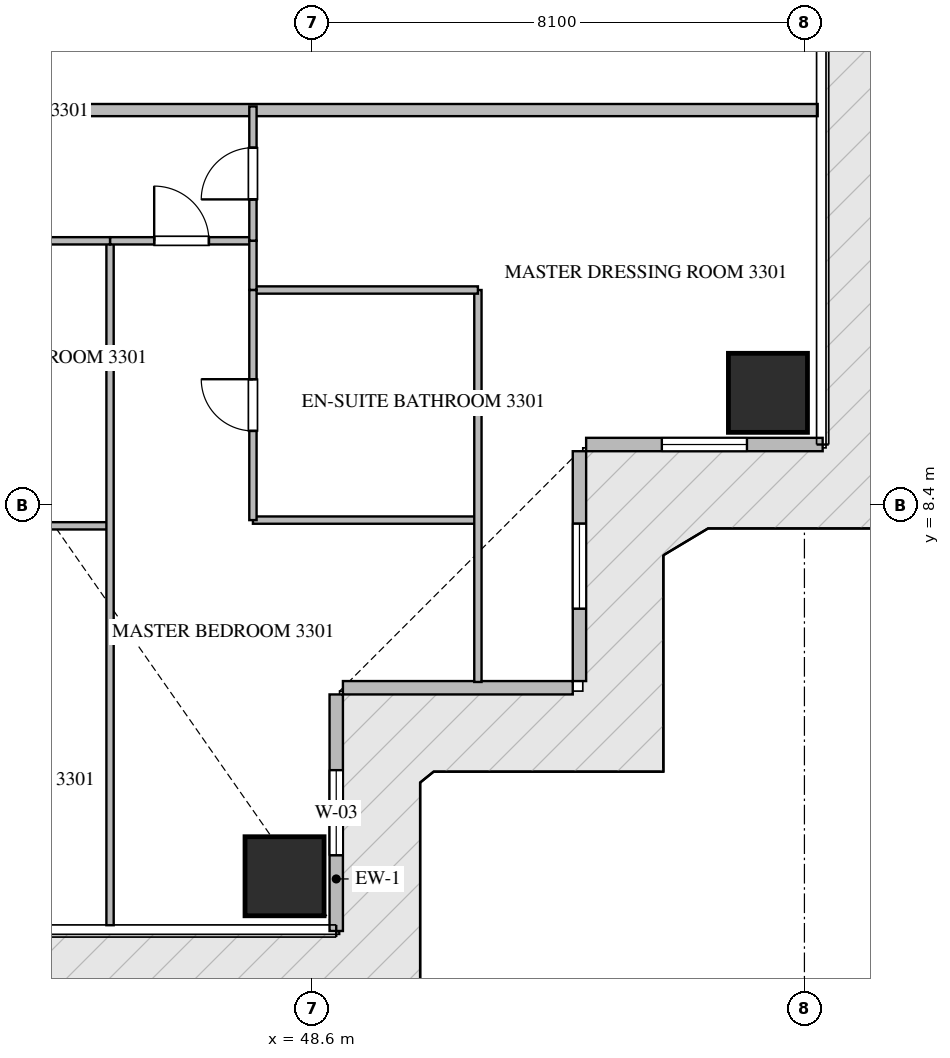
"""IFC4 building model, lengths in metres.
Left out: names, types, materials, properties, quantities, classifications, styles, units other than length and angle.
Written with IfcOpenShell. Run it as: python <this file> out.ifc"""

import sys

from ifc_helpers import new_model, si_unit, direction, frame, frame_2d, origin, origin_2d, place, context, subcontext, project, spatial, rectangle, extrude, source, transform, mapped, element, fill, save


model = new_model("IFC4")
c1 = context("Model", 3, precision=1e-05, world=origin(), true_north=direction((0.0, 1.0)))
c2 = subcontext(c1, "Body", "Model", "MODEL_VIEW")
j1 = project(units=[si_unit("LENGTHUNIT", "METRE"), si_unit("PLANEANGLEUNIT", "RADIAN")], contexts=[c1])
p1 = place(None, origin())
s1 = spatial("IfcSite", under=j1, at=p1, CompositionType="ELEMENT")
p2 = place(p1, origin())
s2 = spatial("IfcBuilding", under=s1, at=p2, CompositionType="ELEMENT")
p3 = place(p2, frame((0.0, 0.0, 135.15)))
s3 = spatial("IfcBuildingStorey", under=s2, at=p3, CompositionType="ELEMENT", Elevation=135.15)
m1 = source(origin(), c2, "Body", "SweptSolid", [
    extrude(rectangle(XDim=1.3, YDim=1.3, at=origin_2d()), origin(), (0.0, 0.0, 1.0), 3.75),
])
for number, where, z_axis, x_axis in (
    (1, (48.15, 2.3, -0.26), (0.0, 0.0, 1.0), (1.0, 0.0, 0.0)),
    (2, (56.1, 10.25, -0.26), (0.0, 0.0, 1.0), (1.0, 0.0, 0.0)),
):
    element("IfcColumn", number, at=place(p3, frame(where, z_axis=z_axis, x_axis=x_axis)), inside=s3, PredefinedType="COLUMN", context=c2, shape_type="MappedRepresentation", body=[
        mapped(m1, transform((0.0, 0.0, 0.0), scale=1.0)),
    ])
p4 = place(p3, frame((49.0, 1.4, 0.0), z_axis=(0.0, 0.0, 1.0), x_axis=(0.0, 1.0, 0.0)))
e3 = element("IfcWall", 3, at=p4, inside=s3, PredefinedType="ELEMENTEDWALL", context=c2, shape_type="SweptSolid", body=[
    extrude(rectangle(XDim=3.89, YDim=0.22, at=frame_2d((1.945, 0.0))), origin(), (0.0, 0.0, 1.0), 3.475),
])
p5 = place(p4, frame((1.245, 0.0, 0.65)))
e4 = element("IfcOpeningElement", 4, at=p5, cuts=e3, PredefinedType="OPENING", context=c2, shape_type="SweptSolid", body=[
    extrude(rectangle(XDim=1.4, YDim=2.05, at=frame_2d((0.7, 1.025))), frame((0.0, 0.12, 0.0), z_axis=(0.0, -1.0, 0.0), x_axis=(1.0, 0.0, 0.0)), (0.0, 0.0, 1.0), 0.24),
])
p6 = place(p3, frame((49.11, 5.4, 0.0), z_axis=(0.0, 0.0, 1.0), x_axis=(1.0, 0.0, 0.0)))
e5 = element("IfcWall", 5, at=p6, inside=s3, PredefinedType="ELEMENTEDWALL", context=c2, shape_type="SweptSolid", body=[
    extrude(rectangle(XDim=3.78, YDim=0.22, at=frame_2d((1.89, 0.0))), origin(), (0.0, 0.0, 1.0), 3.475),
])
p7 = place(p3, frame((53.0, 5.51, 0.0), z_axis=(0.0, 0.0, 1.0), x_axis=(0.0, 1.0, 0.0)))
e6 = element("IfcWall", 6, at=p7, inside=s3, PredefinedType="ELEMENTEDWALL", context=c2, shape_type="SweptSolid", body=[
    extrude(rectangle(XDim=3.78, YDim=0.22, at=frame_2d((1.89, 0.0))), origin(), (0.0, 0.0, 1.0), 3.475),
])
p8 = place(p7, frame((1.19, 0.0, 0.65)))
e7 = element("IfcOpeningElement", 7, at=p8, cuts=e6, PredefinedType="OPENING", context=c2, shape_type="SweptSolid", body=[
    extrude(rectangle(XDim=1.4, YDim=2.05, at=frame_2d((0.7, 1.025))), frame((0.0, 0.12, 0.0), z_axis=(0.0, -1.0, 0.0), x_axis=(1.0, 0.0, 0.0)), (0.0, 0.0, 1.0), 0.24),
])
p9 = place(p3, frame((53.11, 9.4, 0.0), z_axis=(0.0, 0.0, 1.0), x_axis=(1.0, 0.0, 0.0)))
e8 = element("IfcWall", 8, at=p9, inside=s3, PredefinedType="ELEMENTEDWALL", context=c2, shape_type="SweptSolid", body=[
    extrude(rectangle(XDim=3.89, YDim=0.22, at=frame_2d((1.945, 0.0))), origin(), (0.0, 0.0, 1.0), 3.475),
])
p10 = place(p9, frame((1.245, 0.0, 0.65)))
e9 = element("IfcOpeningElement", 9, at=p10, cuts=e8, PredefinedType="OPENING", context=c2, shape_type="SweptSolid", body=[
    extrude(rectangle(XDim=1.4, YDim=2.05, at=frame_2d((0.7, 1.025))), frame((0.0, 0.12, 0.0), z_axis=(0.0, -1.0, 0.0), x_axis=(1.0, 0.0, 0.0)), (0.0, 0.0, 1.0), 0.24),
])
p11 = place(p3, frame((43.85, 14.9, 0.0), z_axis=(0.0, 0.0, 1.0), x_axis=(1.0, 0.0, 0.0)))
e10 = element("IfcWall", 10, at=p11, inside=s3, PredefinedType="PARTITIONING", context=c2, shape_type="SweptSolid", body=[
    extrude(rectangle(XDim=13.068, YDim=0.2, at=frame_2d((6.534, 0.0))), origin(), (0.0, 0.0, 1.0), 3.49),
])
p12 = place(p3, frame((40.13, 8.063, 0.0), z_axis=(0.0, 0.0, 1.0), x_axis=(1.0, 0.0, 0.0)))
e11 = element("IfcWall", 11, at=p12, inside=s3, PredefinedType="PARTITIONING", context=c2, shape_type="SweptSolid", body=[
    extrude(rectangle(XDim=5.15, YDim=0.12, at=frame_2d((2.575, 0.0))), origin(), (0.0, 0.0, 1.0), 3.49),
])
p13 = place(p3, frame((45.28, 1.495, 0.0), z_axis=(0.0, 0.0, 1.0), x_axis=(0.0, 1.0, 0.0)))
e12 = element("IfcWall", 12, at=p13, inside=s3, PredefinedType="PARTITIONING", context=c2, shape_type="SweptSolid", body=[
    extrude(rectangle(XDim=11.255, YDim=0.12, at=frame_2d((5.627, 0.0))), origin(), (0.0, 0.0, 1.0), 3.49),
])
p14 = place(p3, frame((42.232, 12.75, 0.0), z_axis=(0.0, 0.0, 1.0), x_axis=(1.0, 0.0, 0.0)))
e13 = element("IfcWall", 13, at=p14, inside=s3, PredefinedType="PARTITIONING", context=c2, shape_type="SweptSolid", body=[
    extrude(rectangle(XDim=3.048, YDim=0.12, at=frame_2d((1.524, 0.0))), origin(), (0.0, 0.0, 1.0), 3.49),
])
p15 = place(p14, frame((1.099, 0.0, 0.0)))
e14 = element("IfcOpeningElement", 14, at=p15, cuts=e13, PredefinedType="OPENING", context=c2, shape_type="SweptSolid", body=[
    extrude(rectangle(XDim=0.85, YDim=2.1, at=frame_2d((0.425, 1.05))), frame((0.0, 0.07, 0.0), z_axis=(0.0, -1.0, 0.0), x_axis=(1.0, 0.0, 0.0)), (0.0, 0.0, 1.0), 0.14),
])
p16 = place(p3, frame((45.282, 12.75, 0.0), z_axis=(0.0, 0.0, 1.0), x_axis=(1.0, 0.0, 0.0)))
e15 = element("IfcWall", 15, at=p16, inside=s3, PredefinedType="PARTITIONING", context=c2, shape_type="SweptSolid", body=[
    extrude(rectangle(XDim=2.348, YDim=0.12, at=frame_2d((1.174, 0.0))), origin(), (0.0, 0.0, 1.0), 3.49),
])
p17 = place(p16, frame((0.724, 0.0, 0.0)))
e16 = element("IfcOpeningElement", 16, at=p17, cuts=e15, PredefinedType="OPENING", context=c2, shape_type="SweptSolid", body=[
    extrude(rectangle(XDim=0.9, YDim=2.1, at=frame_2d((0.45, 1.05))), frame((0.0, 0.07, 0.0), z_axis=(0.0, -1.0, 0.0), x_axis=(1.0, 0.0, 0.0)), (0.0, 0.0, 1.0), 0.14),
])
p18 = place(p3, frame((47.63, 8.157, 0.0), z_axis=(0.0, 0.0, 1.0), x_axis=(1.0, 0.0, 0.0)))
e17 = element("IfcWall", 17, at=p18, inside=s3, PredefinedType="PARTITIONING", context=c2, shape_type="SweptSolid", body=[
    extrude(rectangle(XDim=3.7, YDim=0.12, at=frame_2d((1.85, 0.0))), origin(), (0.0, 0.0, 1.0), 3.49),
])
p19 = place(p3, frame((51.33, 5.495, 0.0), z_axis=(0.0, 0.0, 1.0), x_axis=(0.0, 1.0, 0.0)))
e18 = element("IfcWall", 18, at=p19, inside=s3, PredefinedType="PARTITIONING", context=c2, shape_type="SweptSolid", body=[
    extrude(rectangle(XDim=6.446, YDim=0.12, at=frame_2d((3.223, 0.0))), origin(), (0.0, 0.0, 1.0), 3.49),
])
p20 = place(p3, frame((47.63, 11.941, 0.0), z_axis=(0.0, 0.0, 1.0), x_axis=(1.0, 0.0, 0.0)))
e19 = element("IfcWall", 19, at=p20, inside=s3, PredefinedType="PARTITIONING", context=c2, shape_type="SweptSolid", body=[
    extrude(rectangle(XDim=3.7, YDim=0.12, at=frame_2d((1.85, 0.0))), origin(), (0.0, 0.0, 1.0), 3.49),
])
p21 = place(p3, frame((47.63, 8.157, 0.0), z_axis=(0.0, 0.0, 1.0), x_axis=(0.0, 1.0, 0.0)))
e20 = element("IfcWall", 20, at=p21, inside=s3, PredefinedType="PARTITIONING", context=c2, shape_type="SweptSolid", body=[
    extrude(rectangle(XDim=3.784, YDim=0.12, at=frame_2d((1.892, 0.0))), origin(), (0.0, 0.0, 1.0), 3.49),
])
p22 = place(p21, frame((1.467, 0.0, 0.0)))
e21 = element("IfcOpeningElement", 21, at=p22, cuts=e20, PredefinedType="OPENING", context=c2, shape_type="SweptSolid", body=[
    extrude(rectangle(XDim=0.85, YDim=2.1, at=frame_2d((0.425, 1.05))), frame((0.0, 0.07, 0.0), z_axis=(0.0, -1.0, 0.0), x_axis=(1.0, 0.0, 0.0)), (0.0, 0.0, 1.0), 0.14),
])
p23 = place(p3, frame((47.63, 11.943, 0.0), z_axis=(0.0, 0.0, 1.0), x_axis=(0.0, 1.0, 0.0)))
e22 = element("IfcWall", 22, at=p23, inside=s3, PredefinedType="PARTITIONING", context=c2, shape_type="SweptSolid", body=[
    extrude(rectangle(XDim=0.807, YDim=0.12, at=frame_2d((0.403, 0.0))), origin(), (0.0, 0.0, 1.0), 3.49),
])
p24 = place(p3, frame((47.63, 12.752, 0.0), z_axis=(0.0, 0.0, 1.0), x_axis=(0.0, 1.0, 0.0)))
e23 = element("IfcWall", 23, at=p24, inside=s3, PredefinedType="PARTITIONING", context=c2, shape_type="SweptSolid", body=[
    extrude(rectangle(XDim=2.208, YDim=0.12, at=frame_2d((1.104, 0.0))), origin(), (0.0, 0.0, 1.0), 3.49),
])
p25 = place(p24, frame((0.679, 0.0, 0.0)))
e24 = element("IfcOpeningElement", 24, at=p25, cuts=e23, PredefinedType="OPENING", context=c2, shape_type="SweptSolid", body=[
    extrude(rectangle(XDim=0.85, YDim=2.1, at=frame_2d((0.425, 1.05))), frame((0.0, 0.07, 0.0), z_axis=(0.0, -1.0, 0.0), x_axis=(1.0, 0.0, 0.0)), (0.0, 0.0, 1.0), 0.14),
])
m2 = source(origin(), c2, "Body", "SweptSolid", [
    extrude(rectangle(XDim=1.4, YDim=2.05, at=frame_2d((0.7, 1.025))), frame((0.0, 0.03, 0.0), z_axis=(0.0, -1.0, 0.0), x_axis=(1.0, 0.0, 0.0)), (0.0, 0.0, 1.0), 0.06),
])
p26 = place(p5, origin())
e25 = element("IfcWindow", 25, at=p26, inside=s3, PartitioningType="SINGLE_PANEL", PredefinedType="WINDOW", context=c2, shape_type="MappedRepresentation", body=[
    mapped(m2, transform((0.0, 0.0, 0.0), scale=1.0)),
])
fill(e4, e25)
p27 = place(p8, origin())
e26 = element("IfcWindow", 26, at=p27, inside=s3, PartitioningType="SINGLE_PANEL", PredefinedType="WINDOW", context=c2, shape_type="MappedRepresentation", body=[
    mapped(m2, transform((0.0, 0.0, 0.0), scale=1.0)),
])
fill(e7, e26)
p28 = place(p10, origin())
e27 = element("IfcWindow", 27, at=p28, inside=s3, PartitioningType="SINGLE_PANEL", PredefinedType="WINDOW", context=c2, shape_type="MappedRepresentation", body=[
    mapped(m2, transform((0.0, 0.0, 0.0), scale=1.0)),
])
fill(e9, e27)
m3 = source(origin(), c2, "Body", "SweptSolid", [
    extrude(rectangle(XDim=0.9, YDim=2.1, at=frame_2d((0.45, 1.05))), frame((0.0, 0.025, 0.0), z_axis=(0.0, -1.0, 0.0), x_axis=(1.0, 0.0, 0.0)), (0.0, 0.0, 1.0), 0.05),
])
p29 = place(p17, origin())
e28 = element("IfcDoor", 28, at=p29, inside=s3, OperationType="SINGLE_SWING_LEFT", PredefinedType="DOOR", context=c2, shape_type="MappedRepresentation", body=[
    mapped(m3, transform((0.0, 0.0, 0.0), scale=1.0)),
])
fill(e16, e28)
m4 = source(origin(), c2, "Body", "SweptSolid", [
    extrude(rectangle(XDim=0.85, YDim=2.1, at=frame_2d((0.425, 1.05))), frame((0.0, 0.025, 0.0), z_axis=(0.0, -1.0, 0.0), x_axis=(1.0, 0.0, 0.0)), (0.0, 0.0, 1.0), 0.05),
])
p30 = place(p22, origin())
e29 = element("IfcDoor", 29, at=p30, inside=s3, OperationType="SINGLE_SWING_RIGHT", PredefinedType="DOOR", context=c2, shape_type="MappedRepresentation", body=[
    mapped(m4, transform((0.0, 0.0, 0.0), scale=1.0)),
])
fill(e21, e29)
p31 = place(p25, origin())
e30 = element("IfcDoor", 30, at=p31, inside=s3, OperationType="SINGLE_SWING_LEFT", PredefinedType="DOOR", context=c2, shape_type="MappedRepresentation", body=[
    mapped(m4, transform((0.0, 0.0, 0.0), scale=1.0)),
])
fill(e24, e30)
save(model, sys.argv[1])
